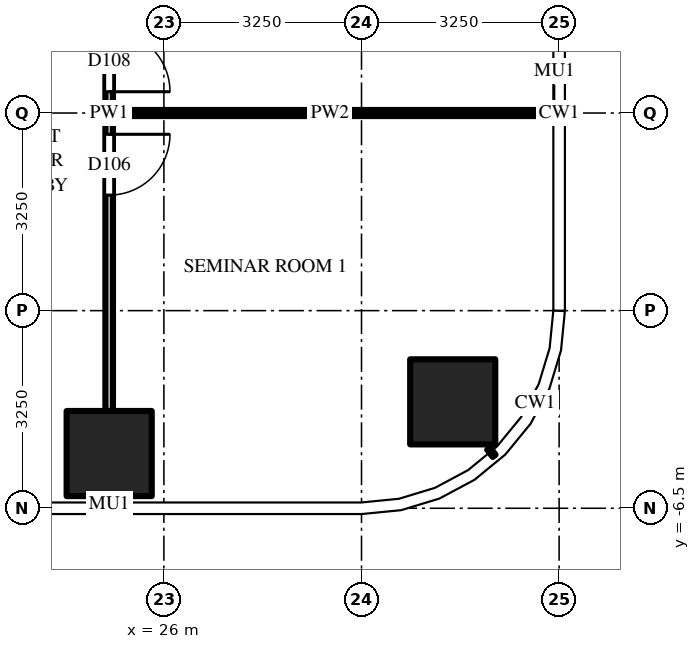
"""IFC4 building model, lengths in metres.
Left out: names, types, materials, properties, quantities, classifications, styles, units other than length and angle.
Written with IfcOpenShell. Run it as: python <this file> out.ifc"""

import sys

from ifc_helpers import new_model, si_unit, direction, frame, frame_2d, origin, origin_2d, place, context, subcontext, project, spatial, rectangle, extrude, source, transform, mapped, element, fill, save


model = new_model("IFC4")
c1 = context("Model", 3, precision=1e-05, world=origin(), true_north=direction((0.0, 1.0)))
c2 = subcontext(c1, "Body", "Model", "MODEL_VIEW")
j1 = project(units=[si_unit("LENGTHUNIT", "METRE"), si_unit("PLANEANGLEUNIT", "RADIAN")], contexts=[c1])
p1 = place(None, origin())
s1 = spatial("IfcSite", under=j1, at=p1, CompositionType="ELEMENT")
p2 = place(p1, origin())
s2 = spatial("IfcBuilding", under=s1, at=p2, CompositionType="ELEMENT")
p3 = place(p2, frame((0.0, 0.0, 70.0)))
s3 = spatial("IfcBuildingStorey", under=s2, at=p3, CompositionType="ELEMENT", Elevation=70.0)
m1 = source(origin(), c2, "Body", "SweptSolid", [
    extrude(rectangle(XDim=1.4, YDim=1.4, at=origin_2d()), origin(), (0.0, 0.0, 1.0), 4.5),
])
for number, where, z_axis, x_axis in (
    (1, (25.1, -5.6, 0.0), (0.0, 0.0, 1.0), (1.0, 0.0, 0.0)),
    (2, (30.75, -4.75, 0.0), (0.0, 0.0, 1.0), (1.0, 0.0, 0.0)),
):
    element("IfcColumn", number, at=place(p3, frame(where, z_axis=z_axis, x_axis=x_axis)), inside=s3, PredefinedType="COLUMN", context=c2, shape_type="MappedRepresentation", body=[
        mapped(m1, transform((0.0, 0.0, 0.0))),
    ])
m2 = source(origin(), c2, "Body", "SweptSolid", [
    extrude(rectangle(XDim=9.8, YDim=0.125, at=frame_2d((4.9, 0.0))), origin(), (0.0, 0.0, 1.0), 3.468),
])
p4 = place(p3, frame((25.1, 4.9, 0.0), z_axis=(0.0, 0.0, 1.0), x_axis=(0.0, -1.0, 0.0)))
e3 = element("IfcWall", 3, at=p4, inside=s3, PredefinedType="PARTITIONING", context=c2, shape_type="MappedRepresentation", body=[
    mapped(m2, transform((0.0, 0.0, 0.0))),
])
m3 = source(origin(), c2, "Body", "SweptSolid", [
    extrude(rectangle(XDim=1.0, YDim=2.1, at=frame_2d((0.5, 1.05))), frame((0.0, 0.073, 0.0), z_axis=(0.0, -1.0, 0.0), x_axis=(1.0, 0.0, 0.0)), (0.0, 0.0, 1.0), 0.145),
])
p5 = place(p4, frame((5.25, 0.0, 0.0)))
e4 = element("IfcOpeningElement", 4, at=p5, cuts=e3, PredefinedType="OPENING", context=c2, shape_type="MappedRepresentation", body=[
    mapped(m3, transform((0.0, 0.0, 0.0))),
])
p6 = place(p4, frame((3.55, 0.0, 0.0)))
e5 = element("IfcOpeningElement", 5, at=p6, cuts=e3, PredefinedType="OPENING", context=c2, shape_type="MappedRepresentation", body=[
    mapped(m3, transform((0.0, 0.0, 0.0))),
])
m4 = source(origin(), c2, "Body", "SweptSolid", [
    extrude(rectangle(XDim=7.137, YDim=0.1, at=frame_2d((3.569, 0.0))), origin(), (0.0, 0.0, 1.0), 3.33),
])
p7 = place(p3, frame((25.163, 0.0, 0.0), z_axis=(0.0, 0.0, 1.0), x_axis=(1.0, 0.0, 0.0)))
e6 = element("IfcWall", 6, at=p7, inside=s3, PredefinedType="PARTITIONING", context=c2, shape_type="MappedRepresentation", body=[
    mapped(m4, transform((0.0, 0.0, 0.0))),
])
m5 = source(origin(), c2, "Body", "SweptSolid", [
    extrude(rectangle(XDim=1.0, YDim=2.1, at=frame_2d((0.5, 1.05))), frame((0.0, 0.025, 0.0), z_axis=(0.0, -1.0, 0.0), x_axis=(1.0, 0.0, 0.0)), (0.0, 0.0, 1.0), 0.05),
])
p8 = place(p5, origin())
e7 = element("IfcDoor", 7, at=p8, inside=s3, OperationType="SINGLE_SWING_LEFT", PredefinedType="DOOR", context=c2, shape_type="MappedRepresentation", body=[
    mapped(m5, transform((0.0, 0.0, 0.0))),
])
fill(e4, e7)
p9 = place(p6, origin())
e8 = element("IfcDoor", 8, at=p9, inside=s3, OperationType="SINGLE_SWING_RIGHT", PredefinedType="DOOR", context=c2, shape_type="MappedRepresentation", body=[
    mapped(m5, transform((0.0, 0.0, 0.0))),
])
fill(e5, e8)
save(model, sys.argv[1])
